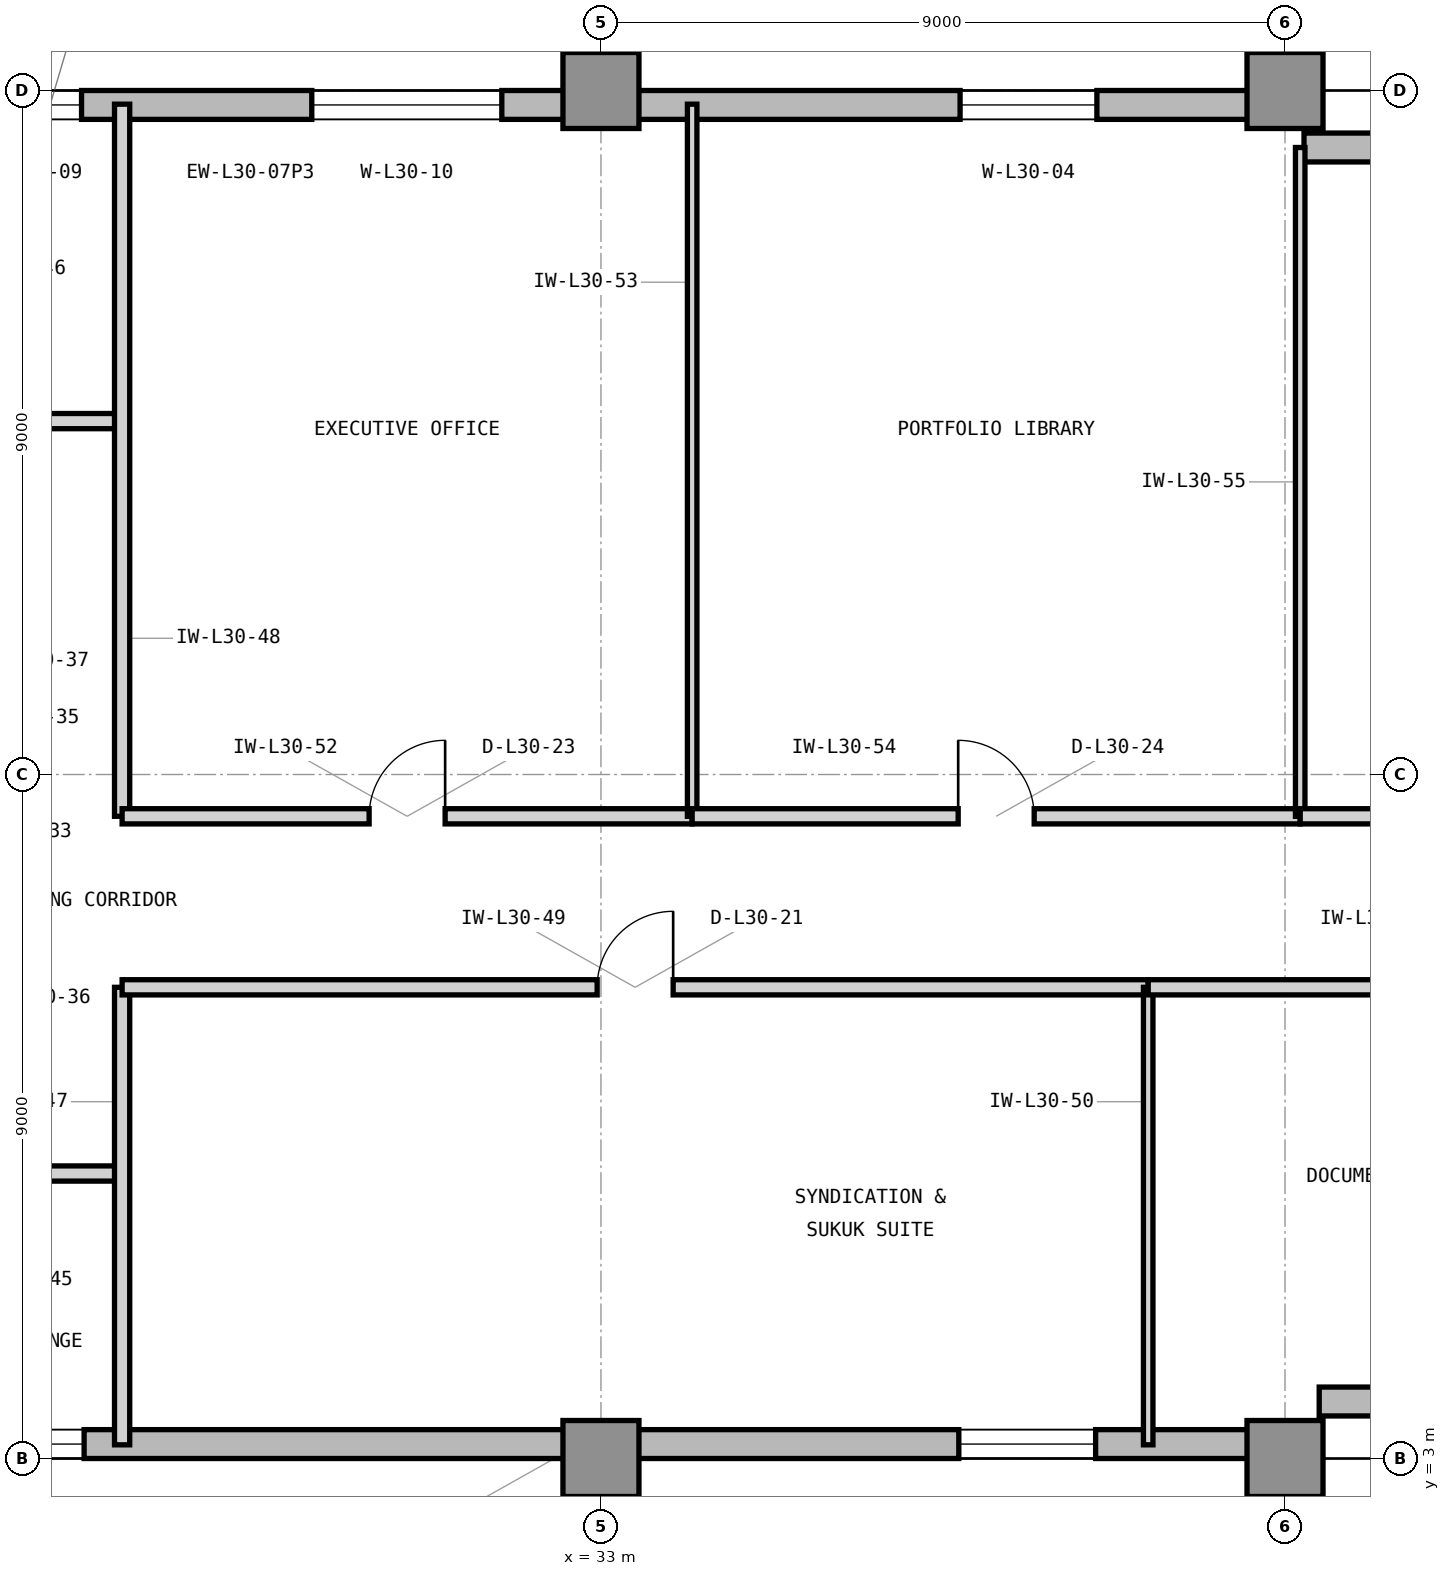
"""IFC4 building model, lengths in metres.
Left out: names, types, materials, properties, quantities, classifications, styles, units other than length and angle.
Written with IfcOpenShell. Run it as: python <this file> out.ifc"""

import sys

from ifc_helpers import new_model, si_unit, direction, frame, frame_2d, origin, origin_2d, place, context, subcontext, project, spatial, rectangle, extrude, element, fill, save


model = new_model("IFC4")
c1 = context("Model", 3, precision=1e-05, world=origin(), true_north=direction((0.0, 1.0)))
c2 = subcontext(c1, "Body", "Model", "MODEL_VIEW")
j1 = project(units=[si_unit("LENGTHUNIT", "METRE"), si_unit("PLANEANGLEUNIT", "RADIAN")], contexts=[c1])
p1 = place(None, origin())
s1 = spatial("IfcSite", under=j1, at=p1, CompositionType="ELEMENT")
p2 = place(p1, origin())
s2 = spatial("IfcBuilding", under=s1, at=p2, CompositionType="ELEMENT")
p3 = place(p2, frame((0.0, 0.0, 128.4)))
s3 = spatial("IfcBuildingStorey", under=s2, at=p3, CompositionType="ELEMENT", Elevation=128.4)
for number, where, z_axis, x_axis in (
    (1, (33.0, 3.0, 0.0), (0.0, 0.0, 1.0), (1.0, 0.0, 0.0)),
    (2, (33.0, 21.0, 0.0), (0.0, 0.0, 1.0), (1.0, 0.0, 0.0)),
    (3, (42.0, 3.0, 0.0), (0.0, 0.0, 1.0), (1.0, 0.0, 0.0)),
    (4, (42.0, 21.0, 0.0), (0.0, 0.0, 1.0), (1.0, 0.0, 0.0)),
):
    element("IfcColumn", number, at=place(p3, frame(where, z_axis=z_axis, x_axis=x_axis)), inside=s3, PredefinedType="COLUMN", context=c2, shape_type="SweptSolid", body=[
        extrude(rectangle(XDim=1.0, YDim=1.0, at=origin_2d()), origin(), (0.0, 0.0, 1.0), 3.9),
    ])
p4 = place(p3, frame((23.9, 3.19, 0.0), z_axis=(0.0, 0.0, 1.0), x_axis=(1.0, 0.0, 0.0)))
e5 = element("IfcWall", 5, at=p4, inside=s3, PredefinedType="STANDARD", context=c2, shape_type="SweptSolid", body=[
    extrude(rectangle(XDim=17.65, YDim=0.38, at=frame_2d((8.825, 0.0))), origin(), (0.0, 0.0, 1.0), 3.7),
])
p5 = place(p4, frame((13.808, 0.0, 0.85)))
e6 = element("IfcOpeningElement", 6, at=p5, cuts=e5, PredefinedType="OPENING", context=c2, shape_type="SweptSolid", body=[
    extrude(rectangle(XDim=1.8, YDim=2.25, at=frame_2d((0.9, 1.125))), frame((0.0, 0.2, 0.0), z_axis=(0.0, -1.0, 0.0), x_axis=(1.0, 0.0, 0.0)), (0.0, 0.0, 1.0), 0.4),
])
p6 = place(p4, frame((1.1, 0.0, 0.85)))
e7 = element("IfcOpeningElement", 7, at=p6, cuts=e5, PredefinedType="OPENING", context=c2, shape_type="SweptSolid", body=[
    extrude(rectangle(XDim=1.2, YDim=2.25, at=frame_2d((0.6, 1.125))), frame((0.0, 0.2, 0.0), z_axis=(0.0, -1.0, 0.0), x_axis=(1.0, 0.0, 0.0)), (0.0, 0.0, 1.0), 0.4),
])
p7 = place(p3, frame((42.45, 3.75, 0.0), z_axis=(0.0, 0.0, 1.0), x_axis=(1.0, 0.0, 0.0)))
e8 = element("IfcWall", 8, at=p7, inside=s3, PredefinedType="STANDARD", context=c2, shape_type="SweptSolid", body=[
    extrude(rectangle(XDim=8.1, YDim=0.38, at=frame_2d((4.05, 0.0))), origin(), (0.0, 0.0, 1.0), 3.7),
])
p8 = place(p3, frame((50.55, 20.25, 0.0), z_axis=(0.0, 0.0, 1.0), x_axis=(-1.0, 0.0, 0.0)))
e9 = element("IfcWall", 9, at=p8, inside=s3, PredefinedType="STANDARD", context=c2, shape_type="SweptSolid", body=[
    extrude(rectangle(XDim=8.3, YDim=0.38, at=frame_2d((4.15, 0.0))), origin(), (0.0, 0.0, 1.0), 3.7),
])
p9 = place(p3, frame((41.55, 20.81, 0.0), z_axis=(0.0, 0.0, 1.0), x_axis=(-1.0, 0.0, 0.0)))
e10 = element("IfcWall", 10, at=p9, inside=s3, PredefinedType="STANDARD", context=c2, shape_type="SweptSolid", body=[
    extrude(rectangle(XDim=17.55, YDim=0.38, at=frame_2d((8.775, 0.0))), origin(), (0.0, 0.0, 1.0), 3.7),
])
p10 = place(p9, frame((2.025, 0.0, 0.85)))
e11 = element("IfcOpeningElement", 11, at=p10, cuts=e10, PredefinedType="OPENING", context=c2, shape_type="SweptSolid", body=[
    extrude(rectangle(XDim=1.8, YDim=2.25, at=frame_2d((0.9, 1.125))), frame((0.0, 0.2, 0.0), z_axis=(0.0, -1.0, 0.0), x_axis=(1.0, 0.0, 0.0)), (0.0, 0.0, 1.0), 0.4),
])
p11 = place(p9, frame((15.384, 0.0, 0.85)))
e12 = element("IfcOpeningElement", 12, at=p11, cuts=e10, PredefinedType="OPENING", context=c2, shape_type="SweptSolid", body=[
    extrude(rectangle(XDim=1.2, YDim=2.25, at=frame_2d((0.6, 1.125))), frame((0.0, 0.2, 0.0), z_axis=(0.0, -1.0, 0.0), x_axis=(1.0, 0.0, 0.0)), (0.0, 0.0, 1.0), 0.4),
])
p12 = place(p9, frame((9.854, 0.0, 0.85)))
e13 = element("IfcOpeningElement", 13, at=p12, cuts=e10, PredefinedType="OPENING", context=c2, shape_type="SweptSolid", body=[
    extrude(rectangle(XDim=2.5, YDim=2.25, at=frame_2d((1.25, 1.125))), frame((0.0, 0.2, 0.0), z_axis=(0.0, -1.0, 0.0), x_axis=(1.0, 0.0, 0.0)), (0.0, 0.0, 1.0), 0.4),
])
p13 = place(p3, frame((23.85, 6.75, 0.0), z_axis=(0.0, 0.0, 1.0), x_axis=(1.0, 0.0, 0.0)))
e14 = element("IfcWall", 14, at=p13, inside=s3, PredefinedType="PARTITIONING", context=c2, shape_type="SweptSolid", body=[
    extrude(rectangle(XDim=2.85, YDim=0.2, at=frame_2d((1.425, 0.0))), origin(), (0.0, 0.0, 1.0), 3.69),
])
p14 = place(p13, frame((0.7, 0.0, 0.0)))
e15 = element("IfcOpeningElement", 15, at=p14, cuts=e14, PredefinedType="OPENING", context=c2, shape_type="SweptSolid", body=[
    extrude(rectangle(XDim=1.0, YDim=2.15, at=frame_2d((0.5, 1.075))), frame((0.0, 0.11, 0.0), z_axis=(0.0, -1.0, 0.0), x_axis=(1.0, 0.0, 0.0)), (0.0, 0.0, 1.0), 0.22),
])
p15 = place(p3, frame((23.85, 16.65, 0.0), z_axis=(0.0, 0.0, 1.0), x_axis=(1.0, 0.0, 0.0)))
e16 = element("IfcWall", 16, at=p15, inside=s3, PredefinedType="PARTITIONING", context=c2, shape_type="SweptSolid", body=[
    extrude(rectangle(XDim=2.85, YDim=0.2, at=frame_2d((1.425, 0.0))), origin(), (0.0, 0.0, 1.0), 3.69),
])
p16 = place(p15, frame((0.7, 0.0, 0.0)))
e17 = element("IfcOpeningElement", 17, at=p16, cuts=e16, PredefinedType="OPENING", context=c2, shape_type="SweptSolid", body=[
    extrude(rectangle(XDim=1.0, YDim=2.15, at=frame_2d((0.5, 1.075))), frame((0.0, 0.11, 0.0), z_axis=(0.0, -1.0, 0.0), x_axis=(1.0, 0.0, 0.0)), (0.0, 0.0, 1.0), 0.22),
])
p17 = place(p3, frame((26.7, 3.18, 0.0), z_axis=(0.0, 0.0, 1.0), x_axis=(0.0, 1.0, 0.0)))
e18 = element("IfcWall", 18, at=p17, inside=s3, PredefinedType="PARTITIONING", context=c2, shape_type="SweptSolid", body=[
    extrude(rectangle(XDim=6.02, YDim=0.2, at=frame_2d((3.01, 0.0))), origin(), (0.0, 0.0, 1.0), 3.69),
])
p18 = place(p3, frame((26.7, 11.45, 0.0), z_axis=(0.0, 0.0, 1.0), x_axis=(0.0, 1.0, 0.0)))
e19 = element("IfcWall", 19, at=p18, inside=s3, PredefinedType="PARTITIONING", context=c2, shape_type="SweptSolid", body=[
    extrude(rectangle(XDim=9.37, YDim=0.2, at=frame_2d((4.685, 0.0))), origin(), (0.0, 0.0, 1.0), 3.69),
])
p19 = place(p3, frame((26.7, 9.2, 0.0), z_axis=(0.0, 0.0, 1.0), x_axis=(1.0, 0.0, 0.0)))
e20 = element("IfcWall", 20, at=p19, inside=s3, PredefinedType="PARTITIONING", context=c2, shape_type="SweptSolid", body=[
    extrude(rectangle(XDim=13.5, YDim=0.2, at=frame_2d((6.75, 0.0))), origin(), (0.0, 0.0, 1.0), 3.69),
])
p20 = place(p19, frame((6.25, 0.0, 0.0)))
e21 = element("IfcOpeningElement", 21, at=p20, cuts=e20, PredefinedType="OPENING", context=c2, shape_type="SweptSolid", body=[
    extrude(rectangle(XDim=1.0, YDim=2.15, at=frame_2d((0.5, 1.075))), frame((0.0, 0.11, 0.0), z_axis=(0.0, -1.0, 0.0), x_axis=(1.0, 0.0, 0.0)), (0.0, 0.0, 1.0), 0.22),
])
p21 = place(p3, frame((40.2, 3.18, 0.0), z_axis=(0.0, 0.0, 1.0), x_axis=(0.0, 1.0, 0.0)))
e22 = element("IfcWall", 22, at=p21, inside=s3, PredefinedType="PARTITIONING", context=c2, shape_type="SweptSolid", body=[
    extrude(rectangle(XDim=6.02, YDim=0.125, at=frame_2d((3.01, 0.0))), origin(), (0.0, 0.0, 1.0), 3.69),
])
p22 = place(p3, frame((40.2, 9.2, 0.0), z_axis=(0.0, 0.0, 1.0), x_axis=(1.0, 0.0, 0.0)))
e23 = element("IfcWall", 23, at=p22, inside=s3, PredefinedType="PARTITIONING", context=c2, shape_type="SweptSolid", body=[
    extrude(rectangle(XDim=11.8, YDim=0.2, at=frame_2d((5.9, 0.0))), origin(), (0.0, 0.0, 1.0), 3.69),
])
p23 = place(p22, frame((5.4, 0.0, 0.0)))
e24 = element("IfcOpeningElement", 24, at=p23, cuts=e23, PredefinedType="OPENING", context=c2, shape_type="SweptSolid", body=[
    extrude(rectangle(XDim=1.0, YDim=2.15, at=frame_2d((0.5, 1.075))), frame((0.0, 0.11, 0.0), z_axis=(0.0, -1.0, 0.0), x_axis=(1.0, 0.0, 0.0)), (0.0, 0.0, 1.0), 0.22),
])
p24 = place(p3, frame((26.7, 11.45, 0.0), z_axis=(0.0, 0.0, 1.0), x_axis=(1.0, 0.0, 0.0)))
e25 = element("IfcWall", 25, at=p24, inside=s3, PredefinedType="PARTITIONING", context=c2, shape_type="SweptSolid", body=[
    extrude(rectangle(XDim=7.5, YDim=0.2, at=frame_2d((3.75, 0.0))), origin(), (0.0, 0.0, 1.0), 3.69),
])
p25 = place(p24, frame((3.25, 0.0, 0.0)))
e26 = element("IfcOpeningElement", 26, at=p25, cuts=e25, PredefinedType="OPENING", context=c2, shape_type="SweptSolid", body=[
    extrude(rectangle(XDim=1.0, YDim=2.15, at=frame_2d((0.5, 1.075))), frame((0.0, 0.11, 0.0), z_axis=(0.0, -1.0, 0.0), x_axis=(1.0, 0.0, 0.0)), (0.0, 0.0, 1.0), 0.22),
])
p26 = place(p3, frame((34.2, 11.45, 0.0), z_axis=(0.0, 0.0, 1.0), x_axis=(0.0, 1.0, 0.0)))
e27 = element("IfcWall", 27, at=p26, inside=s3, PredefinedType="PARTITIONING", context=c2, shape_type="SweptSolid", body=[
    extrude(rectangle(XDim=9.37, YDim=0.125, at=frame_2d((4.685, 0.0))), origin(), (0.0, 0.0, 1.0), 3.69),
])
p27 = place(p3, frame((34.2, 11.45, 0.0), z_axis=(0.0, 0.0, 1.0), x_axis=(1.0, 0.0, 0.0)))
e28 = element("IfcWall", 28, at=p27, inside=s3, PredefinedType="PARTITIONING", context=c2, shape_type="SweptSolid", body=[
    extrude(rectangle(XDim=8.0, YDim=0.2, at=frame_2d((4.0, 0.0))), origin(), (0.0, 0.0, 1.0), 3.69),
])
p28 = place(p27, frame((3.5, 0.0, 0.0)))
e29 = element("IfcOpeningElement", 29, at=p28, cuts=e28, PredefinedType="OPENING", context=c2, shape_type="SweptSolid", body=[
    extrude(rectangle(XDim=1.0, YDim=2.15, at=frame_2d((0.5, 1.075))), frame((0.0, 0.11, 0.0), z_axis=(0.0, -1.0, 0.0), x_axis=(1.0, 0.0, 0.0)), (0.0, 0.0, 1.0), 0.22),
])
p29 = place(p3, frame((42.2, 11.45, 0.0), z_axis=(0.0, 0.0, 1.0), x_axis=(0.0, 1.0, 0.0)))
e30 = element("IfcWall", 30, at=p29, inside=s3, PredefinedType="PARTITIONING", context=c2, shape_type="SweptSolid", body=[
    extrude(rectangle(XDim=8.8, YDim=0.125, at=frame_2d((4.4, 0.0))), origin(), (0.0, 0.0, 1.0), 3.69),
])
p30 = place(p3, frame((42.2, 11.45, 0.0), z_axis=(0.0, 0.0, 1.0), x_axis=(1.0, 0.0, 0.0)))
e31 = element("IfcWall", 31, at=p30, inside=s3, PredefinedType="PARTITIONING", context=c2, shape_type="SweptSolid", body=[
    extrude(rectangle(XDim=9.8, YDim=0.2, at=frame_2d((4.9, 0.0))), origin(), (0.0, 0.0, 1.0), 3.69),
])
p31 = place(p30, frame((4.4, 0.0, 0.0)))
e32 = element("IfcOpeningElement", 32, at=p31, cuts=e31, PredefinedType="OPENING", context=c2, shape_type="SweptSolid", body=[
    extrude(rectangle(XDim=1.0, YDim=2.15, at=frame_2d((0.5, 1.075))), frame((0.0, 0.11, 0.0), z_axis=(0.0, -1.0, 0.0), x_axis=(1.0, 0.0, 0.0)), (0.0, 0.0, 1.0), 0.22),
])
p32 = place(p5, origin())
e33 = element("IfcWindow", 33, at=p32, inside=s3, PartitioningType="SINGLE_PANEL", PredefinedType="WINDOW", context=c2, shape_type="SweptSolid", body=[
    extrude(rectangle(XDim=1.8, YDim=2.25, at=frame_2d((0.9, 1.125))), frame((0.0, 0.11, 0.0), z_axis=(0.0, -1.0, 0.0), x_axis=(1.0, 0.0, 0.0)), (0.0, 0.0, 1.0), 0.06),
])
fill(e6, e33)
p33 = place(p10, origin())
e34 = element("IfcWindow", 34, at=p33, inside=s3, PartitioningType="SINGLE_PANEL", PredefinedType="WINDOW", context=c2, shape_type="SweptSolid", body=[
    extrude(rectangle(XDim=1.8, YDim=2.25, at=frame_2d((0.9, 1.125))), frame((0.0, 0.11, 0.0), z_axis=(0.0, -1.0, 0.0), x_axis=(1.0, 0.0, 0.0)), (0.0, 0.0, 1.0), 0.06),
])
fill(e11, e34)
p34 = place(p20, origin())
e35 = element("IfcDoor", 35, at=p34, inside=s3, OperationType="SINGLE_SWING_RIGHT", PredefinedType="DOOR", context=c2, shape_type="SweptSolid", body=[
    extrude(rectangle(XDim=1.0, YDim=2.15, at=frame_2d((0.5, 1.075))), frame((0.0, 0.025, 0.0), z_axis=(0.0, -1.0, 0.0), x_axis=(1.0, 0.0, 0.0)), (0.0, 0.0, 1.0), 0.05),
])
fill(e21, e35)
p35 = place(p25, origin())
e36 = element("IfcDoor", 36, at=p35, inside=s3, OperationType="SINGLE_SWING_RIGHT", PredefinedType="DOOR", context=c2, shape_type="SweptSolid", body=[
    extrude(rectangle(XDim=1.0, YDim=2.15, at=frame_2d((0.5, 1.075))), frame((0.0, 0.025, 0.0), z_axis=(0.0, -1.0, 0.0), x_axis=(1.0, 0.0, 0.0)), (0.0, 0.0, 1.0), 0.05),
])
fill(e26, e36)
p36 = place(p28, origin())
e37 = element("IfcDoor", 37, at=p36, inside=s3, OperationType="SINGLE_SWING_LEFT", PredefinedType="DOOR", context=c2, shape_type="SweptSolid", body=[
    extrude(rectangle(XDim=1.0, YDim=2.15, at=frame_2d((0.5, 1.075))), frame((0.0, 0.025, 0.0), z_axis=(0.0, -1.0, 0.0), x_axis=(1.0, 0.0, 0.0)), (0.0, 0.0, 1.0), 0.05),
])
fill(e29, e37)
p37 = place(p6, origin())
e38 = element("IfcWindow", 38, at=p37, inside=s3, PartitioningType="SINGLE_PANEL", PredefinedType="WINDOW", context=c2, shape_type="SweptSolid", body=[
    extrude(rectangle(XDim=1.2, YDim=2.25, at=frame_2d((0.6, 1.125))), frame((0.0, 0.11, 0.0), z_axis=(0.0, -1.0, 0.0), x_axis=(1.0, 0.0, 0.0)), (0.0, 0.0, 1.0), 0.06),
])
fill(e7, e38)
p38 = place(p11, origin())
e39 = element("IfcWindow", 39, at=p38, inside=s3, PartitioningType="SINGLE_PANEL", PredefinedType="WINDOW", context=c2, shape_type="SweptSolid", body=[
    extrude(rectangle(XDim=1.2, YDim=2.25, at=frame_2d((0.6, 1.125))), frame((0.0, 0.11, 0.0), z_axis=(0.0, -1.0, 0.0), x_axis=(1.0, 0.0, 0.0)), (0.0, 0.0, 1.0), 0.06),
])
fill(e12, e39)
p39 = place(p12, origin())
e40 = element("IfcWindow", 40, at=p39, inside=s3, PartitioningType="SINGLE_PANEL", PredefinedType="WINDOW", context=c2, shape_type="SweptSolid", body=[
    extrude(rectangle(XDim=2.5, YDim=2.25, at=frame_2d((1.25, 1.125))), frame((0.0, 0.11, 0.0), z_axis=(0.0, -1.0, 0.0), x_axis=(1.0, 0.0, 0.0)), (0.0, 0.0, 1.0), 0.06),
])
fill(e13, e40)
save(model, sys.argv[1])
